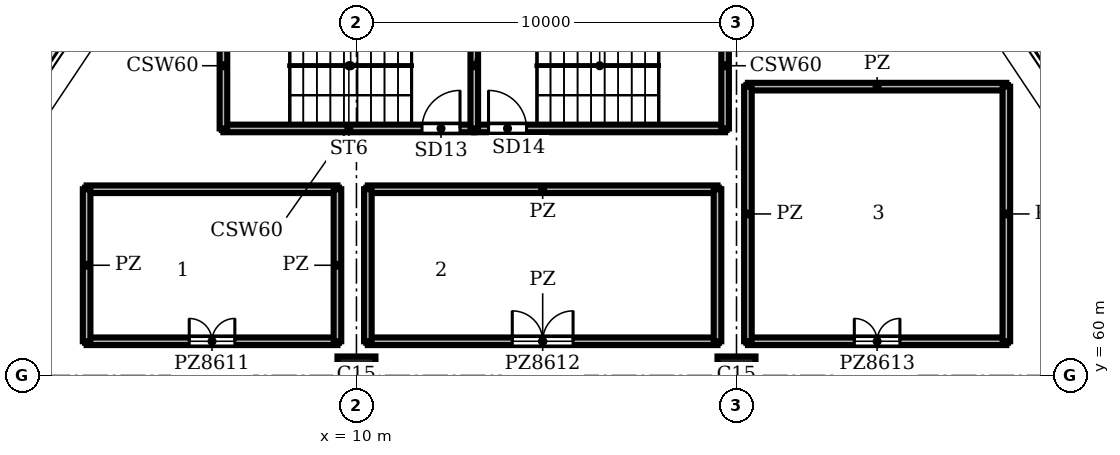
"""IFC4 building model, lengths in metres.
Left out: names, types, materials, properties, quantities, classifications, styles, units other than length and angle.
Written with IfcOpenShell. Run it as: python <this file> out.ifc"""

import sys

from ifc_helpers import new_model, si_unit, direction, frame, frame_2d, origin, origin_2d, place, context, subcontext, project, spatial, rectangle, extrude, element, fill, save


model = new_model("IFC4")
c1 = context("Model", 3, precision=1e-05, world=origin(), true_north=direction((0.0, 1.0)))
c2 = subcontext(c1, "Body", "Model", "MODEL_VIEW")
j1 = project(units=[si_unit("LENGTHUNIT", "METRE"), si_unit("PLANEANGLEUNIT", "RADIAN")], contexts=[c1])
p1 = place(None, origin())
s1 = spatial("IfcSite", under=j1, at=p1, CompositionType="ELEMENT")
p2 = place(p1, origin())
s2 = spatial("IfcBuilding", under=s1, at=p2, CompositionType="ELEMENT")
p3 = place(p2, frame((0.0, 0.0, 352.8)))
s3 = spatial("IfcBuildingStorey", under=s2, at=p3, CompositionType="ELEMENT", Elevation=352.8)
for number, where, z_axis, x_axis in (
    (1, (10.0, 60.0, 0.0), (0.0, 0.0, 1.0), (1.0, 0.0, 0.0)),
    (2, (20.0, 60.0, 0.0), (0.0, 0.0, 1.0), (1.0, 0.0, 0.0)),
):
    element("IfcColumn", number, at=place(p3, frame(where, z_axis=z_axis, x_axis=x_axis)), inside=s3, PredefinedType="COLUMN", context=c2, shape_type="SweptSolid", body=[
        extrude(rectangle(XDim=1.0, YDim=1.0, at=origin_2d()), origin(), (0.0, 0.0, 1.0), 5.4),
    ])
p4 = place(p3, frame((6.5, 66.5, 0.0), z_axis=(0.0, 0.0, 1.0), x_axis=(1.0, 0.0, 0.0)))
e3 = element("IfcWall", 3, at=p4, inside=s3, PredefinedType="SHEAR", context=c2, shape_type="SweptSolid", body=[
    extrude(rectangle(XDim=6.6, YDim=0.2, at=frame_2d((3.3, 0.0))), origin(), (0.0, 0.0, 1.0), 5.0),
])
p5 = place(p4, frame((5.225, 0.0, 0.0)))
e4 = element("IfcOpeningElement", 4, at=p5, cuts=e3, PredefinedType="OPENING", context=c2, shape_type="SweptSolid", body=[
    extrude(rectangle(XDim=1.0, YDim=2.1, at=frame_2d((0.5, 1.05))), frame((0.0, 0.11, 0.0), z_axis=(0.0, -1.0, 0.0), x_axis=(1.0, 0.0, 0.0)), (0.0, 0.0, 1.0), 0.22),
])
p6 = place(p3, frame((13.1, 66.5, 0.0), z_axis=(0.0, 0.0, 1.0), x_axis=(1.0, 0.0, 0.0)))
e5 = element("IfcWall", 5, at=p6, inside=s3, PredefinedType="SHEAR", context=c2, shape_type="SweptSolid", body=[
    extrude(rectangle(XDim=6.6, YDim=0.2, at=frame_2d((3.3, 0.0))), origin(), (0.0, 0.0, 1.0), 5.0),
])
p7 = place(p6, frame((0.375, 0.0, 0.0)))
e6 = element("IfcOpeningElement", 6, at=p7, cuts=e5, PredefinedType="OPENING", context=c2, shape_type="SweptSolid", body=[
    extrude(rectangle(XDim=1.0, YDim=2.1, at=frame_2d((0.5, 1.05))), frame((0.0, 0.11, 0.0), z_axis=(0.0, -1.0, 0.0), x_axis=(1.0, 0.0, 0.0)), (0.0, 0.0, 1.0), 0.22),
])
for number, where, z_axis, x_axis in (
    (7, (6.5, 66.5, 0.0), (0.0, 0.0, 1.0), (0.0, 1.0, 0.0)),
    (8, (13.1, 66.5, 0.0), (0.0, 0.0, 1.0), (0.0, 1.0, 0.0)),
    (9, (19.7, 66.5, 0.0), (0.0, 0.0, 1.0), (0.0, 1.0, 0.0)),
):
    element("IfcWall", number, at=place(p3, frame(where, z_axis=z_axis, x_axis=x_axis)), inside=s3, PredefinedType="SHEAR", context=c2, shape_type="SweptSolid", body=[
        extrude(rectangle(XDim=3.3, YDim=0.2, at=frame_2d((1.65, 0.0))), origin(), (0.0, 0.0, 1.0), 5.0),
    ])
p8 = place(p3, frame((2.9, 60.9, 0.0), z_axis=(0.0, 0.0, 1.0), x_axis=(1.0, 0.0, 0.0)))
e10 = element("IfcWall", 10, at=p8, inside=s3, PredefinedType="PARTITIONING", context=c2, shape_type="SweptSolid", body=[
    extrude(rectangle(XDim=6.6, YDim=0.2, at=frame_2d((3.3, 0.0))), origin(), (0.0, 0.0, 1.0), 5.0),
])
p9 = place(p8, frame((2.7, 0.0, 0.0)))
e11 = element("IfcOpeningElement", 11, at=p9, cuts=e10, PredefinedType="OPENING", context=c2, shape_type="SweptSolid", body=[
    extrude(rectangle(XDim=1.2, YDim=2.1, at=frame_2d((0.6, 1.05))), frame((0.0, 0.11, 0.0), z_axis=(0.0, -1.0, 0.0), x_axis=(1.0, 0.0, 0.0)), (0.0, 0.0, 1.0), 0.22),
])
p10 = place(p3, frame((2.9, 64.9, 0.0), z_axis=(0.0, 0.0, 1.0), x_axis=(1.0, 0.0, 0.0)))
e12 = element("IfcWall", 12, at=p10, inside=s3, PredefinedType="PARTITIONING", context=c2, shape_type="SweptSolid", body=[
    extrude(rectangle(XDim=6.6, YDim=0.2, at=frame_2d((3.3, 0.0))), origin(), (0.0, 0.0, 1.0), 5.0),
])
p11 = place(p3, frame((10.3, 60.9, 0.0), z_axis=(0.0, 0.0, 1.0), x_axis=(1.0, 0.0, 0.0)))
e13 = element("IfcWall", 13, at=p11, inside=s3, PredefinedType="PARTITIONING", context=c2, shape_type="SweptSolid", body=[
    extrude(rectangle(XDim=9.2, YDim=0.2, at=frame_2d((4.6, 0.0))), origin(), (0.0, 0.0, 1.0), 5.0),
])
p12 = place(p11, frame((3.8, 0.0, 0.0)))
e14 = element("IfcOpeningElement", 14, at=p12, cuts=e13, PredefinedType="OPENING", context=c2, shape_type="SweptSolid", body=[
    extrude(rectangle(XDim=1.6, YDim=2.1, at=frame_2d((0.8, 1.05))), frame((0.0, 0.11, 0.0), z_axis=(0.0, -1.0, 0.0), x_axis=(1.0, 0.0, 0.0)), (0.0, 0.0, 1.0), 0.22),
])
p13 = place(p3, frame((10.3, 64.9, 0.0), z_axis=(0.0, 0.0, 1.0), x_axis=(1.0, 0.0, 0.0)))
e15 = element("IfcWall", 15, at=p13, inside=s3, PredefinedType="PARTITIONING", context=c2, shape_type="SweptSolid", body=[
    extrude(rectangle(XDim=9.2, YDim=0.2, at=frame_2d((4.6, 0.0))), origin(), (0.0, 0.0, 1.0), 5.0),
])
p14 = place(p3, frame((20.3, 60.9, 0.0), z_axis=(0.0, 0.0, 1.0), x_axis=(1.0, 0.0, 0.0)))
e16 = element("IfcWall", 16, at=p14, inside=s3, PredefinedType="PARTITIONING", context=c2, shape_type="SweptSolid", body=[
    extrude(rectangle(XDim=6.8, YDim=0.2, at=frame_2d((3.4, 0.0))), origin(), (0.0, 0.0, 1.0), 5.0),
])
p15 = place(p14, frame((2.8, 0.0, 0.0)))
e17 = element("IfcOpeningElement", 17, at=p15, cuts=e16, PredefinedType="OPENING", context=c2, shape_type="SweptSolid", body=[
    extrude(rectangle(XDim=1.2, YDim=2.1, at=frame_2d((0.6, 1.05))), frame((0.0, 0.11, 0.0), z_axis=(0.0, -1.0, 0.0), x_axis=(1.0, 0.0, 0.0)), (0.0, 0.0, 1.0), 0.22),
])
p16 = place(p3, frame((20.3, 67.6, 0.0), z_axis=(0.0, 0.0, 1.0), x_axis=(1.0, 0.0, 0.0)))
e18 = element("IfcWall", 18, at=p16, inside=s3, PredefinedType="PARTITIONING", context=c2, shape_type="SweptSolid", body=[
    extrude(rectangle(XDim=6.8, YDim=0.2, at=frame_2d((3.4, 0.0))), origin(), (0.0, 0.0, 1.0), 5.0),
])
for number, where, z_axis, x_axis in (
    (19, (2.9, 60.9, 0.0), (0.0, 0.0, 1.0), (0.0, 1.0, 0.0)),
    (20, (9.5, 60.9, 0.0), (0.0, 0.0, 1.0), (0.0, 1.0, 0.0)),
    (21, (10.3, 60.9, 0.0), (0.0, 0.0, 1.0), (0.0, 1.0, 0.0)),
    (22, (19.5, 60.9, 0.0), (0.0, 0.0, 1.0), (0.0, 1.0, 0.0)),
):
    element("IfcWall", number, at=place(p3, frame(where, z_axis=z_axis, x_axis=x_axis)), inside=s3, PredefinedType="PARTITIONING", context=c2, shape_type="SweptSolid", body=[
        extrude(rectangle(XDim=4.0, YDim=0.2, at=frame_2d((2.0, 0.0))), origin(), (0.0, 0.0, 1.0), 5.0),
    ])
for number, where, z_axis, x_axis in (
    (23, (20.3, 60.9, 0.0), (0.0, 0.0, 1.0), (0.0, 1.0, 0.0)),
    (24, (27.1, 60.9, 0.0), (0.0, 0.0, 1.0), (0.0, 1.0, 0.0)),
):
    element("IfcWall", number, at=place(p3, frame(where, z_axis=z_axis, x_axis=x_axis)), inside=s3, PredefinedType="PARTITIONING", context=c2, shape_type="SweptSolid", body=[
        extrude(rectangle(XDim=6.7, YDim=0.2, at=frame_2d((3.35, 0.0))), origin(), (0.0, 0.0, 1.0), 5.0),
    ])
p17 = place(p5, origin())
e25 = element("IfcDoor", 25, at=p17, inside=s3, OperationType="SINGLE_SWING_RIGHT", PredefinedType="DOOR", context=c2, shape_type="SweptSolid", body=[
    extrude(rectangle(XDim=1.0, YDim=2.1, at=frame_2d((0.5, 1.05))), frame((0.0, 0.025, 0.0), z_axis=(0.0, -1.0, 0.0), x_axis=(1.0, 0.0, 0.0)), (0.0, 0.0, 1.0), 0.05),
])
fill(e4, e25)
p18 = place(p7, origin())
e26 = element("IfcDoor", 26, at=p18, inside=s3, OperationType="SINGLE_SWING_LEFT", PredefinedType="DOOR", context=c2, shape_type="SweptSolid", body=[
    extrude(rectangle(XDim=1.0, YDim=2.1, at=frame_2d((0.5, 1.05))), frame((0.0, 0.025, 0.0), z_axis=(0.0, -1.0, 0.0), x_axis=(1.0, 0.0, 0.0)), (0.0, 0.0, 1.0), 0.05),
])
fill(e6, e26)
p19 = place(p9, origin())
e27 = element("IfcDoor", 27, at=p19, inside=s3, OperationType="DOUBLE_DOOR_SINGLE_SWING", PredefinedType="DOOR", context=c2, shape_type="SweptSolid", body=[
    extrude(rectangle(XDim=1.2, YDim=2.1, at=frame_2d((0.6, 1.05))), frame((0.0, 0.025, 0.0), z_axis=(0.0, -1.0, 0.0), x_axis=(1.0, 0.0, 0.0)), (0.0, 0.0, 1.0), 0.05),
])
fill(e11, e27)
p20 = place(p12, origin())
e28 = element("IfcDoor", 28, at=p20, inside=s3, OperationType="DOUBLE_DOOR_DOUBLE_SWING", PredefinedType="DOOR", context=c2, shape_type="SweptSolid", body=[
    extrude(rectangle(XDim=1.6, YDim=2.1, at=frame_2d((0.8, 1.05))), frame((0.0, 0.025, 0.0), z_axis=(0.0, -1.0, 0.0), x_axis=(1.0, 0.0, 0.0)), (0.0, 0.0, 1.0), 0.05),
])
fill(e14, e28)
p21 = place(p15, origin())
e29 = element("IfcDoor", 29, at=p21, inside=s3, OperationType="DOUBLE_DOOR_SINGLE_SWING", PredefinedType="DOOR", context=c2, shape_type="SweptSolid", body=[
    extrude(rectangle(XDim=1.2, YDim=2.1, at=frame_2d((0.6, 1.05))), frame((0.0, 0.025, 0.0), z_axis=(0.0, -1.0, 0.0), x_axis=(1.0, 0.0, 0.0)), (0.0, 0.0, 1.0), 0.05),
])
fill(e17, e29)
save(model, sys.argv[1])
